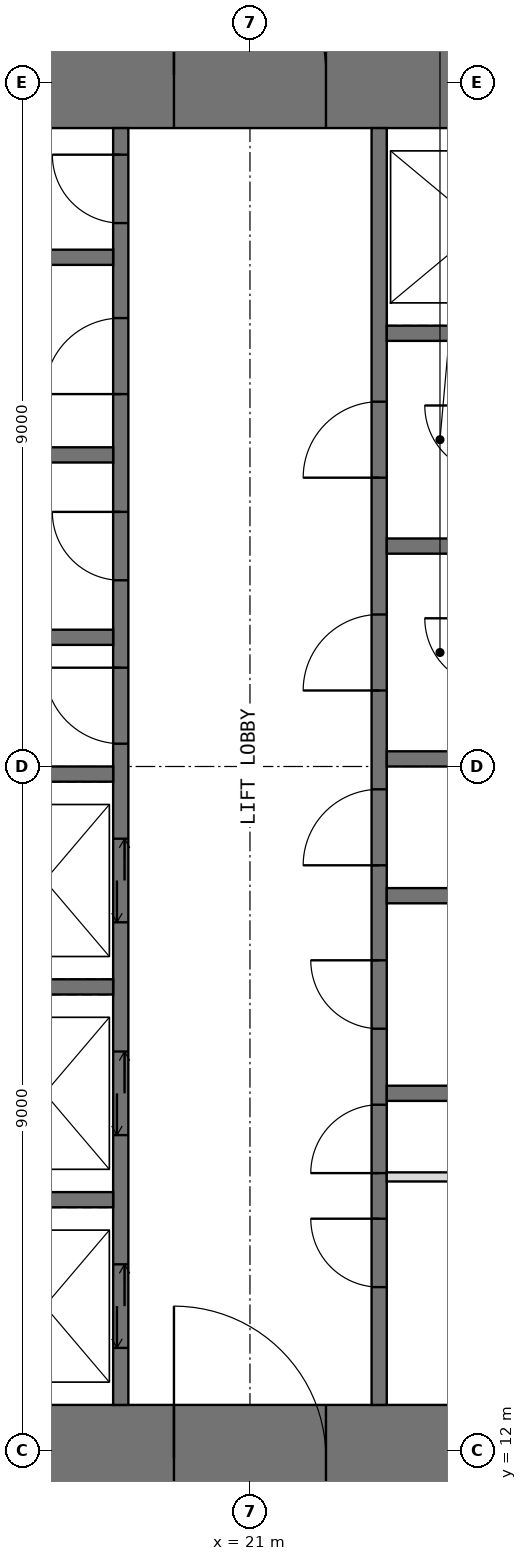
"""IFC4 building model, lengths in metres.
Left out: names, types, materials, properties, quantities, classifications, styles, units other than length and angle.
Written with IfcOpenShell. Run it as: python <this file> out.ifc"""

import sys

from ifc_helpers import new_model, si_unit, direction, frame, frame_2d, origin, place, context, subcontext, project, spatial, rectangle, extrude, element, fill, save


model = new_model("IFC4")
c1 = context("Model", 3, precision=1e-05, world=origin(), true_north=direction((0.0, 1.0)))
c2 = subcontext(c1, "Body", "Model", "MODEL_VIEW")
j1 = project(units=[si_unit("LENGTHUNIT", "METRE"), si_unit("PLANEANGLEUNIT", "RADIAN")], contexts=[c1])
p1 = place(None, origin())
s1 = spatial("IfcSite", under=j1, at=p1, CompositionType="ELEMENT")
p2 = place(p1, origin())
s2 = spatial("IfcBuilding", under=s1, at=p2, CompositionType="ELEMENT")
p3 = place(p2, frame((0.0, 0.0, 194.5)))
s3 = spatial("IfcBuildingStorey", under=s2, at=p3, CompositionType="ELEMENT", Elevation=194.5)
p4 = place(p3, frame((11.2, 11.9, -0.05), z_axis=(0.0, 0.0, 1.0), x_axis=(1.0, 0.0, 0.0)))
e1 = element("IfcWall", 1, at=p4, inside=s3, PredefinedType="SHEAR", context=c2, shape_type="SweptSolid", body=[
    extrude(rectangle(XDim=19.6, YDim=1.4, at=frame_2d((9.8, 0.0))), origin(), (0.0, 0.0, 1.0), 4.0),
])
p5 = place(p4, frame((8.8, 0.0, 0.05)))
e2 = element("IfcOpeningElement", 2, at=p5, cuts=e1, PredefinedType="OPENING", context=c2, shape_type="SweptSolid", body=[
    extrude(rectangle(XDim=2.0, YDim=2.2, at=frame_2d((1.0, 1.1))), frame((0.0, 0.71, 0.0), z_axis=(0.0, -1.0, 0.0), x_axis=(1.0, 0.0, 0.0)), (0.0, 0.0, 1.0), 1.42),
])
p6 = place(p3, frame((11.2, 30.1, -0.05), z_axis=(0.0, 0.0, 1.0), x_axis=(1.0, 0.0, 0.0)))
e3 = element("IfcWall", 3, at=p6, inside=s3, PredefinedType="SHEAR", context=c2, shape_type="SweptSolid", body=[
    extrude(rectangle(XDim=19.6, YDim=1.4, at=frame_2d((9.8, 0.0))), origin(), (0.0, 0.0, 1.0), 4.0),
])
p7 = place(p6, frame((8.8, 0.0, 0.05)))
e4 = element("IfcOpeningElement", 4, at=p7, cuts=e3, PredefinedType="OPENING", context=c2, shape_type="SweptSolid", body=[
    extrude(rectangle(XDim=2.0, YDim=2.2, at=frame_2d((1.0, 1.1))), frame((0.0, 0.71, 0.0), z_axis=(0.0, -1.0, 0.0), x_axis=(1.0, 0.0, 0.0)), (0.0, 0.0, 1.0), 1.42),
])
p8 = place(p3, frame((19.3, 12.6, -0.05), z_axis=(0.0, 0.0, 1.0), x_axis=(0.0, 1.0, 0.0)))
e5 = element("IfcWall", 5, at=p8, inside=s3, PredefinedType="SHEAR", context=c2, shape_type="SweptSolid", body=[
    extrude(rectangle(XDim=16.8, YDim=0.2, at=frame_2d((8.4, 0.0))), origin(), (0.0, 0.0, 1.0), 4.0),
])
p9 = place(p8, frame((8.7, 0.0, 0.05)))
e6 = element("IfcOpeningElement", 6, at=p9, cuts=e5, PredefinedType="OPENING", context=c2, shape_type="SweptSolid", body=[
    extrude(rectangle(XDim=1.0, YDim=2.2, at=frame_2d((0.5, 1.1))), frame((0.0, 0.11, 0.0), z_axis=(0.0, -1.0, 0.0), x_axis=(1.0, 0.0, 0.0)), (0.0, 0.0, 1.0), 0.22),
])
p10 = place(p8, frame((10.85, 0.0, 0.05)))
e7 = element("IfcOpeningElement", 7, at=p10, cuts=e5, PredefinedType="OPENING", context=c2, shape_type="SweptSolid", body=[
    extrude(rectangle(XDim=0.9, YDim=2.2, at=frame_2d((0.45, 1.1))), frame((0.0, 0.11, 0.0), z_axis=(0.0, -1.0, 0.0), x_axis=(1.0, 0.0, 0.0)), (0.0, 0.0, 1.0), 0.22),
])
p11 = place(p8, frame((13.3, 0.0, 0.05)))
e8 = element("IfcOpeningElement", 8, at=p11, cuts=e5, PredefinedType="OPENING", context=c2, shape_type="SweptSolid", body=[
    extrude(rectangle(XDim=1.0, YDim=2.2, at=frame_2d((0.5, 1.1))), frame((0.0, 0.11, 0.0), z_axis=(0.0, -1.0, 0.0), x_axis=(1.0, 0.0, 0.0)), (0.0, 0.0, 1.0), 0.22),
])
p12 = place(p8, frame((15.55, 0.0, 0.05)))
e9 = element("IfcOpeningElement", 9, at=p12, cuts=e5, PredefinedType="OPENING", context=c2, shape_type="SweptSolid", body=[
    extrude(rectangle(XDim=0.9, YDim=2.2, at=frame_2d((0.45, 1.1))), frame((0.0, 0.11, 0.0), z_axis=(0.0, -1.0, 0.0), x_axis=(1.0, 0.0, 0.0)), (0.0, 0.0, 1.0), 0.22),
])
p13 = place(p8, frame((0.75, 0.0, 0.05)))
e10 = element("IfcOpeningElement", 10, at=p13, cuts=e5, PredefinedType="OPENING", context=c2, shape_type="SweptSolid", body=[
    extrude(rectangle(XDim=1.1, YDim=2.2, at=frame_2d((0.55, 1.1))), frame((0.0, 0.11, 0.0), z_axis=(0.0, -1.0, 0.0), x_axis=(1.0, 0.0, 0.0)), (0.0, 0.0, 1.0), 0.22),
])
p14 = place(p8, frame((3.55, 0.0, 0.05)))
e11 = element("IfcOpeningElement", 11, at=p14, cuts=e5, PredefinedType="OPENING", context=c2, shape_type="SweptSolid", body=[
    extrude(rectangle(XDim=1.1, YDim=2.2, at=frame_2d((0.55, 1.1))), frame((0.0, 0.11, 0.0), z_axis=(0.0, -1.0, 0.0), x_axis=(1.0, 0.0, 0.0)), (0.0, 0.0, 1.0), 0.22),
])
p15 = place(p8, frame((6.35, 0.0, 0.05)))
e12 = element("IfcOpeningElement", 12, at=p15, cuts=e5, PredefinedType="OPENING", context=c2, shape_type="SweptSolid", body=[
    extrude(rectangle(XDim=1.1, YDim=2.2, at=frame_2d((0.55, 1.1))), frame((0.0, 0.11, 0.0), z_axis=(0.0, -1.0, 0.0), x_axis=(1.0, 0.0, 0.0)), (0.0, 0.0, 1.0), 0.22),
])
p16 = place(p3, frame((22.7, 12.6, -0.05), z_axis=(0.0, 0.0, 1.0), x_axis=(0.0, 1.0, 0.0)))
e13 = element("IfcWall", 13, at=p16, inside=s3, PredefinedType="SHEAR", context=c2, shape_type="SweptSolid", body=[
    extrude(rectangle(XDim=16.8, YDim=0.2, at=frame_2d((8.4, 0.0))), origin(), (0.0, 0.0, 1.0), 4.0),
])
p17 = place(p16, frame((3.05, 0.0, 0.05)))
e14 = element("IfcOpeningElement", 14, at=p17, cuts=e13, PredefinedType="OPENING", context=c2, shape_type="SweptSolid", body=[
    extrude(rectangle(XDim=0.9, YDim=2.2, at=frame_2d((0.45, 1.1))), frame((0.0, 0.11, 0.0), z_axis=(0.0, -1.0, 0.0), x_axis=(1.0, 0.0, 0.0)), (0.0, 0.0, 1.0), 0.22),
])
p18 = place(p16, frame((7.1, 0.0, 0.05)))
e15 = element("IfcOpeningElement", 15, at=p18, cuts=e13, PredefinedType="OPENING", context=c2, shape_type="SweptSolid", body=[
    extrude(rectangle(XDim=1.0, YDim=2.2, at=frame_2d((0.5, 1.1))), frame((0.0, 0.11, 0.0), z_axis=(0.0, -1.0, 0.0), x_axis=(1.0, 0.0, 0.0)), (0.0, 0.0, 1.0), 0.22),
])
p19 = place(p16, frame((1.55, 0.0, 0.05)))
e16 = element("IfcOpeningElement", 16, at=p19, cuts=e13, PredefinedType="OPENING", context=c2, shape_type="SweptSolid", body=[
    extrude(rectangle(XDim=0.9, YDim=2.2, at=frame_2d((0.45, 1.1))), frame((0.0, 0.11, 0.0), z_axis=(0.0, -1.0, 0.0), x_axis=(1.0, 0.0, 0.0)), (0.0, 0.0, 1.0), 0.22),
])
p20 = place(p16, frame((4.95, 0.0, 0.05)))
e17 = element("IfcOpeningElement", 17, at=p20, cuts=e13, PredefinedType="OPENING", context=c2, shape_type="SweptSolid", body=[
    extrude(rectangle(XDim=0.9, YDim=2.2, at=frame_2d((0.45, 1.1))), frame((0.0, 0.11, 0.0), z_axis=(0.0, -1.0, 0.0), x_axis=(1.0, 0.0, 0.0)), (0.0, 0.0, 1.0), 0.22),
])
p21 = place(p16, frame((9.4, 0.0, 0.05)))
e18 = element("IfcOpeningElement", 18, at=p21, cuts=e13, PredefinedType="OPENING", context=c2, shape_type="SweptSolid", body=[
    extrude(rectangle(XDim=1.0, YDim=2.2, at=frame_2d((0.5, 1.1))), frame((0.0, 0.11, 0.0), z_axis=(0.0, -1.0, 0.0), x_axis=(1.0, 0.0, 0.0)), (0.0, 0.0, 1.0), 0.22),
])
p22 = place(p16, frame((12.2, 0.0, 0.05)))
e19 = element("IfcOpeningElement", 19, at=p22, cuts=e13, PredefinedType="OPENING", context=c2, shape_type="SweptSolid", body=[
    extrude(rectangle(XDim=1.0, YDim=2.2, at=frame_2d((0.5, 1.1))), frame((0.0, 0.11, 0.0), z_axis=(0.0, -1.0, 0.0), x_axis=(1.0, 0.0, 0.0)), (0.0, 0.0, 1.0), 0.22),
])
for number, where, z_axis, x_axis in (
    (20, (16.0, 15.3, -0.05), (0.0, 0.0, 1.0), (1.0, 0.0, 0.0)),
    (21, (16.0, 18.1, -0.05), (0.0, 0.0, 1.0), (1.0, 0.0, 0.0)),
    (22, (16.0, 20.9, -0.05), (0.0, 0.0, 1.0), (1.0, 0.0, 0.0)),
    (23, (16.0, 22.7, -0.05), (0.0, 0.0, 1.0), (1.0, 0.0, 0.0)),
    (24, (16.0, 25.1, -0.05), (0.0, 0.0, 1.0), (1.0, 0.0, 0.0)),
    (25, (16.0, 27.7, -0.05), (0.0, 0.0, 1.0), (1.0, 0.0, 0.0)),
    (26, (22.8, 16.7, -0.05), (0.0, 0.0, 1.0), (1.0, 0.0, 0.0)),
    (27, (22.8, 19.3, -0.05), (0.0, 0.0, 1.0), (1.0, 0.0, 0.0)),
    (28, (22.8, 21.1, -0.05), (0.0, 0.0, 1.0), (1.0, 0.0, 0.0)),
    (29, (22.8, 23.9, -0.05), (0.0, 0.0, 1.0), (1.0, 0.0, 0.0)),
    (30, (22.8, 26.7, -0.05), (0.0, 0.0, 1.0), (1.0, 0.0, 0.0)),
):
    element("IfcWall", number, at=place(p3, frame(where, z_axis=z_axis, x_axis=x_axis)), inside=s3, PredefinedType="SHEAR", context=c2, shape_type="SweptSolid", body=[
        extrude(rectangle(XDim=3.2, YDim=0.2, at=frame_2d((1.6, 0.0))), origin(), (0.0, 0.0, 1.0), 4.0),
    ])
p23 = place(p3, frame((22.8, 15.6, 0.0), z_axis=(0.0, 0.0, 1.0), x_axis=(1.0, 0.0, 0.0)))
e31 = element("IfcWall", 31, at=p23, inside=s3, PredefinedType="PARTITIONING", context=c2, shape_type="SweptSolid", body=[
    extrude(rectangle(XDim=3.2, YDim=0.12, at=frame_2d((1.6, 0.0))), origin(), (0.0, 0.0, 1.0), 3.75),
])
p24 = place(p5, origin())
e32 = element("IfcDoor", 32, at=p24, inside=s3, OperationType="DOUBLE_DOOR_SINGLE_SWING", PredefinedType="DOOR", context=c2, shape_type="SweptSolid", body=[
    extrude(rectangle(XDim=2.0, YDim=2.2, at=frame_2d((1.0, 1.1))), frame((0.0, 0.025, 0.0), z_axis=(0.0, -1.0, 0.0), x_axis=(1.0, 0.0, 0.0)), (0.0, 0.0, 1.0), 0.05),
])
fill(e2, e32)
p25 = place(p7, origin())
e33 = element("IfcDoor", 33, at=p25, inside=s3, OperationType="DOUBLE_DOOR_SINGLE_SWING", PredefinedType="DOOR", context=c2, shape_type="SweptSolid", body=[
    extrude(rectangle(XDim=2.0, YDim=2.2, at=frame_2d((1.0, 1.1))), frame((0.0, 0.025, 0.0), z_axis=(0.0, -1.0, 0.0), x_axis=(1.0, 0.0, 0.0)), (0.0, 0.0, 1.0), 0.05),
])
fill(e4, e33)
p26 = place(p17, origin())
e34 = element("IfcDoor", 34, at=p26, inside=s3, OperationType="SINGLE_SWING_LEFT", PredefinedType="DOOR", context=c2, shape_type="SweptSolid", body=[
    extrude(rectangle(XDim=0.9, YDim=2.2, at=frame_2d((0.45, 1.1))), frame((0.0, 0.025, 0.0), z_axis=(0.0, -1.0, 0.0), x_axis=(1.0, 0.0, 0.0)), (0.0, 0.0, 1.0), 0.05),
])
fill(e14, e34)
p27 = place(p9, origin())
e35 = element("IfcDoor", 35, at=p27, inside=s3, OperationType="SINGLE_SWING_RIGHT", PredefinedType="DOOR", context=c2, shape_type="SweptSolid", body=[
    extrude(rectangle(XDim=1.0, YDim=2.2, at=frame_2d((0.5, 1.1))), frame((0.0, 0.025, 0.0), z_axis=(0.0, -1.0, 0.0), x_axis=(1.0, 0.0, 0.0)), (0.0, 0.0, 1.0), 0.05),
])
fill(e6, e35)
p28 = place(p18, origin())
e36 = element("IfcDoor", 36, at=p28, inside=s3, OperationType="SINGLE_SWING_LEFT", PredefinedType="DOOR", context=c2, shape_type="SweptSolid", body=[
    extrude(rectangle(XDim=1.0, YDim=2.2, at=frame_2d((0.5, 1.1))), frame((0.0, 0.025, 0.0), z_axis=(0.0, -1.0, 0.0), x_axis=(1.0, 0.0, 0.0)), (0.0, 0.0, 1.0), 0.05),
])
fill(e15, e36)
p29 = place(p10, origin())
e37 = element("IfcDoor", 37, at=p29, inside=s3, OperationType="SINGLE_SWING_RIGHT", PredefinedType="DOOR", context=c2, shape_type="SweptSolid", body=[
    extrude(rectangle(XDim=0.9, YDim=2.2, at=frame_2d((0.45, 1.1))), frame((0.0, 0.025, 0.0), z_axis=(0.0, -1.0, 0.0), x_axis=(1.0, 0.0, 0.0)), (0.0, 0.0, 1.0), 0.05),
])
fill(e7, e37)
p30 = place(p11, origin())
e38 = element("IfcDoor", 38, at=p30, inside=s3, OperationType="SINGLE_SWING_LEFT", PredefinedType="DOOR", context=c2, shape_type="SweptSolid", body=[
    extrude(rectangle(XDim=1.0, YDim=2.2, at=frame_2d((0.5, 1.1))), frame((0.0, 0.025, 0.0), z_axis=(0.0, -1.0, 0.0), x_axis=(1.0, 0.0, 0.0)), (0.0, 0.0, 1.0), 0.05),
])
fill(e8, e38)
p31 = place(p12, origin())
e39 = element("IfcDoor", 39, at=p31, inside=s3, OperationType="SINGLE_SWING_RIGHT", PredefinedType="DOOR", context=c2, shape_type="SweptSolid", body=[
    extrude(rectangle(XDim=0.9, YDim=2.2, at=frame_2d((0.45, 1.1))), frame((0.0, 0.025, 0.0), z_axis=(0.0, -1.0, 0.0), x_axis=(1.0, 0.0, 0.0)), (0.0, 0.0, 1.0), 0.05),
])
fill(e9, e39)
p32 = place(p19, origin())
e40 = element("IfcDoor", 40, at=p32, inside=s3, OperationType="SINGLE_SWING_RIGHT", PredefinedType="DOOR", context=c2, shape_type="SweptSolid", body=[
    extrude(rectangle(XDim=0.9, YDim=2.2, at=frame_2d((0.45, 1.1))), frame((0.0, 0.025, 0.0), z_axis=(0.0, -1.0, 0.0), x_axis=(1.0, 0.0, 0.0)), (0.0, 0.0, 1.0), 0.05),
])
fill(e16, e40)
p33 = place(p20, origin())
e41 = element("IfcDoor", 41, at=p33, inside=s3, OperationType="SINGLE_SWING_RIGHT", PredefinedType="DOOR", context=c2, shape_type="SweptSolid", body=[
    extrude(rectangle(XDim=0.9, YDim=2.2, at=frame_2d((0.45, 1.1))), frame((0.0, 0.025, 0.0), z_axis=(0.0, -1.0, 0.0), x_axis=(1.0, 0.0, 0.0)), (0.0, 0.0, 1.0), 0.05),
])
fill(e17, e41)
p34 = place(p21, origin())
e42 = element("IfcDoor", 42, at=p34, inside=s3, OperationType="SINGLE_SWING_LEFT", PredefinedType="DOOR", context=c2, shape_type="SweptSolid", body=[
    extrude(rectangle(XDim=1.0, YDim=2.2, at=frame_2d((0.5, 1.1))), frame((0.0, 0.025, 0.0), z_axis=(0.0, -1.0, 0.0), x_axis=(1.0, 0.0, 0.0)), (0.0, 0.0, 1.0), 0.05),
])
fill(e18, e42)
p35 = place(p22, origin())
e43 = element("IfcDoor", 43, at=p35, inside=s3, OperationType="SINGLE_SWING_LEFT", PredefinedType="DOOR", context=c2, shape_type="SweptSolid", body=[
    extrude(rectangle(XDim=1.0, YDim=2.2, at=frame_2d((0.5, 1.1))), frame((0.0, 0.025, 0.0), z_axis=(0.0, -1.0, 0.0), x_axis=(1.0, 0.0, 0.0)), (0.0, 0.0, 1.0), 0.05),
])
fill(e19, e43)
p36 = place(p13, origin())
e44 = element("IfcDoor", 44, at=p36, inside=s3, OperationType="DOUBLE_DOOR_SLIDING", PredefinedType="DOOR", context=c2, shape_type="SweptSolid", body=[
    extrude(rectangle(XDim=1.1, YDim=2.2, at=frame_2d((0.55, 1.1))), frame((0.0, 0.025, 0.0), z_axis=(0.0, -1.0, 0.0), x_axis=(1.0, 0.0, 0.0)), (0.0, 0.0, 1.0), 0.05),
])
fill(e10, e44)
p37 = place(p14, origin())
e45 = element("IfcDoor", 45, at=p37, inside=s3, OperationType="DOUBLE_DOOR_SLIDING", PredefinedType="DOOR", context=c2, shape_type="SweptSolid", body=[
    extrude(rectangle(XDim=1.1, YDim=2.2, at=frame_2d((0.55, 1.1))), frame((0.0, 0.025, 0.0), z_axis=(0.0, -1.0, 0.0), x_axis=(1.0, 0.0, 0.0)), (0.0, 0.0, 1.0), 0.05),
])
fill(e11, e45)
p38 = place(p15, origin())
e46 = element("IfcDoor", 46, at=p38, inside=s3, OperationType="DOUBLE_DOOR_SLIDING", PredefinedType="DOOR", context=c2, shape_type="SweptSolid", body=[
    extrude(rectangle(XDim=1.1, YDim=2.2, at=frame_2d((0.55, 1.1))), frame((0.0, 0.025, 0.0), z_axis=(0.0, -1.0, 0.0), x_axis=(1.0, 0.0, 0.0)), (0.0, 0.0, 1.0), 0.05),
])
fill(e12, e46)
save(model, sys.argv[1])
